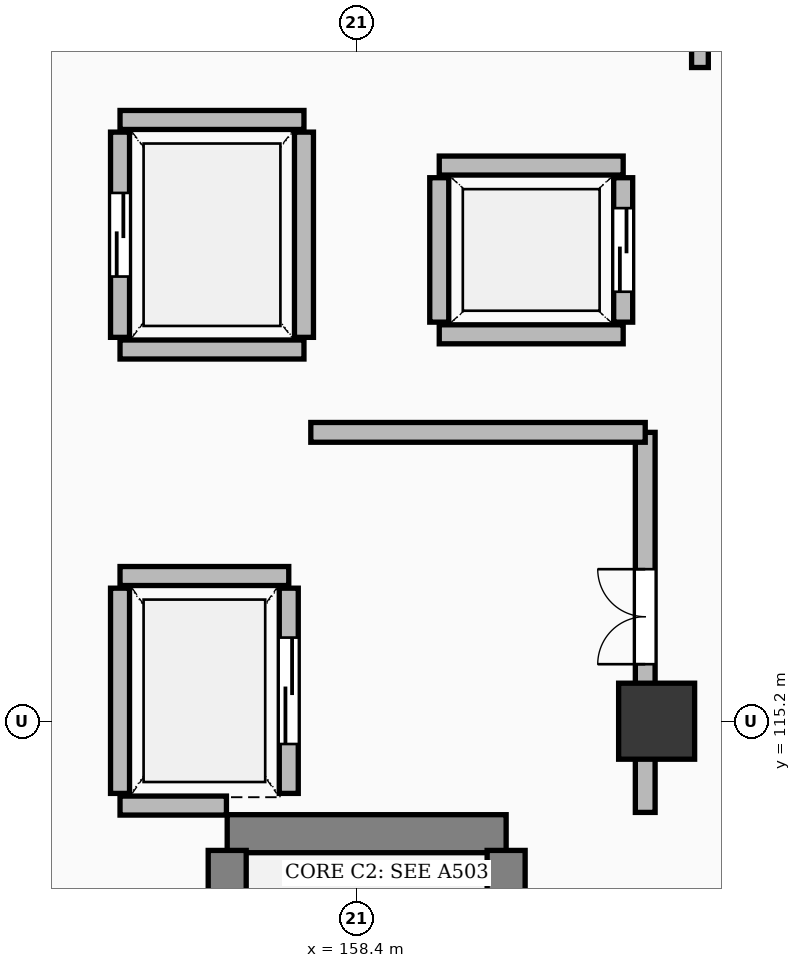
"""IFC4 building model, lengths in metres.
Left out: names, types, materials, properties, quantities, classifications, styles, units other than length and angle.
Written with IfcOpenShell. Run it as: python <this file> out.ifc"""

import sys

from ifc_helpers import new_model, si_unit, direction, frame, frame_2d, origin, origin_2d, place, context, subcontext, project, spatial, rectangle, extrude, element, fill, save


model = new_model("IFC4")
c1 = context("Model", 3, precision=1e-05, world=origin(), true_north=direction((0.0, 1.0)))
c2 = subcontext(c1, "Body", "Model", "MODEL_VIEW")
j1 = project(units=[si_unit("LENGTHUNIT", "METRE"), si_unit("PLANEANGLEUNIT", "RADIAN")], contexts=[c1])
p1 = place(None, origin())
s1 = spatial("IfcSite", under=j1, at=p1, CompositionType="ELEMENT")
p2 = place(p1, origin())
s2 = spatial("IfcBuilding", under=s1, at=p2, CompositionType="ELEMENT")
p3 = place(p2, frame((0.0, 0.0, 6.0)))
s3 = spatial("IfcBuildingStorey", under=s2, at=p3, CompositionType="ELEMENT", Elevation=6.0)
p4 = place(p3, frame((162.35, 115.2, 0.0), z_axis=(0.0, 0.0, 1.0), x_axis=(1.0, 0.0, 0.0)))
e1 = element("IfcColumn", 1, at=p4, inside=s3, PredefinedType="COLUMN", context=c2, shape_type="SweptSolid", body=[
    extrude(rectangle(XDim=1.0, YDim=1.0, at=origin_2d()), origin(), (0.0, 0.0, 1.0), 5.4),
])
p5 = place(p3, frame((156.7, 113.72, 0.0), z_axis=(0.0, 0.0, 1.0), x_axis=(1.0, 0.0, 0.0)))
e2 = element("IfcWall", 2, at=p5, inside=s3, PredefinedType="SHEAR", context=c2, shape_type="SweptSolid", body=[
    extrude(rectangle(XDim=3.67, YDim=0.5, at=frame_2d((1.835, 0.0))), origin(), (0.0, 0.0, 1.0), 5.1),
])
p6 = place(p3, frame((156.7, 103.0, 0.0), z_axis=(0.0, 0.0, 1.0), x_axis=(0.0, 1.0, 0.0)))
e3 = element("IfcWall", 3, at=p6, inside=s3, PredefinedType="SHEAR", context=c2, shape_type="SweptSolid", body=[
    extrude(rectangle(XDim=10.5, YDim=0.5, at=frame_2d((5.25, 0.0))), origin(), (0.0, 0.0, 1.0), 5.1),
])
p7 = place(p3, frame((160.37, 103.0, 0.0), z_axis=(0.0, 0.0, 1.0), x_axis=(0.0, 1.0, 0.0)))
e4 = element("IfcWall", 4, at=p7, inside=s3, PredefinedType="SHEAR", context=c2, shape_type="SweptSolid", body=[
    extrude(rectangle(XDim=10.5, YDim=0.5, at=frame_2d((5.25, 0.0))), origin(), (0.0, 0.0, 1.0), 5.1),
])
p8 = place(p7, frame((0.45, 0.0, 0.0)))
e5 = element("IfcOpeningElement", 5, at=p8, cuts=e4, PredefinedType="OPENING", context=c2, shape_type="SweptSolid", body=[
    extrude(rectangle(XDim=1.3, YDim=2.15, at=frame_2d((0.65, 1.075))), frame((0.0, 0.262, 0.0), z_axis=(0.0, -1.0, 0.0), x_axis=(1.0, 0.0, 0.0)), (0.0, 0.0, 1.0), 0.524),
])
p9 = place(p3, frame((155.29, 114.09, 0.0), z_axis=(0.0, 0.0, 1.0), x_axis=(1.0, 0.0, 0.0)))
e6 = element("IfcWall", 6, at=p9, inside=s3, PredefinedType="SOLIDWALL", context=c2, shape_type="SweptSolid", body=[
    extrude(rectangle(XDim=1.4, YDim=0.25, at=frame_2d((0.7, 0.0))), origin(), (0.0, 0.0, 1.0), 5.1),
])
p10 = place(p3, frame((155.29, 117.11, 0.0), z_axis=(0.0, 0.0, 1.0), x_axis=(1.0, 0.0, 0.0)))
e7 = element("IfcWall", 7, at=p10, inside=s3, PredefinedType="SOLIDWALL", context=c2, shape_type="SweptSolid", body=[
    extrude(rectangle(XDim=2.22, YDim=0.25, at=frame_2d((1.11, 0.0))), origin(), (0.0, 0.0, 1.0), 5.1),
])
p11 = place(p3, frame((155.29, 114.25, 0.0), z_axis=(0.0, 0.0, 1.0), x_axis=(0.0, 1.0, 0.0)))
e8 = element("IfcWall", 8, at=p11, inside=s3, PredefinedType="SOLIDWALL", context=c2, shape_type="SweptSolid", body=[
    extrude(rectangle(XDim=2.7, YDim=0.25, at=frame_2d((1.35, 0.0))), origin(), (0.0, 0.0, 1.0), 4.312),
])
p12 = place(p3, frame((157.51, 114.25, 0.0), z_axis=(0.0, 0.0, 1.0), x_axis=(0.0, 1.0, 0.0)))
e9 = element("IfcWall", 9, at=p12, inside=s3, PredefinedType="SOLIDWALL", context=c2, shape_type="SweptSolid", body=[
    extrude(rectangle(XDim=2.7, YDim=0.25, at=frame_2d((1.35, 0.0))), origin(), (0.0, 0.0, 1.0), 4.312),
])
p13 = place(p12, frame((0.65, 0.0, 0.0)))
e10 = element("IfcOpeningElement", 10, at=p13, cuts=e9, PredefinedType="OPENING", context=c2, shape_type="SweptSolid", body=[
    extrude(rectangle(XDim=1.4, YDim=2.3, at=frame_2d((0.7, 1.15))), frame((0.0, 0.137, 0.0), z_axis=(0.0, -1.0, 0.0), x_axis=(1.0, 0.0, 0.0)), (0.0, 0.0, 1.0), 0.274),
])
for number, where, z_axis, x_axis in (
    (11, (159.49, 120.29, 0.0), (0.0, 0.0, 1.0), (1.0, 0.0, 0.0)),
    (12, (159.49, 122.51, 0.0), (0.0, 0.0, 1.0), (1.0, 0.0, 0.0)),
):
    element("IfcWall", number, at=place(p3, frame(where, z_axis=z_axis, x_axis=x_axis)), inside=s3, PredefinedType="SOLIDWALL", context=c2, shape_type="SweptSolid", body=[
        extrude(rectangle(XDim=2.42, YDim=0.25, at=frame_2d((1.21, 0.0))), origin(), (0.0, 0.0, 1.0), 5.1),
    ])
p14 = place(p3, frame((159.49, 120.45, 0.0), z_axis=(0.0, 0.0, 1.0), x_axis=(0.0, 1.0, 0.0)))
e13 = element("IfcWall", 13, at=p14, inside=s3, PredefinedType="SOLIDWALL", context=c2, shape_type="SweptSolid", body=[
    extrude(rectangle(XDim=1.9, YDim=0.25, at=frame_2d((0.95, 0.0))), origin(), (0.0, 0.0, 1.0), 5.1),
])
p15 = place(p3, frame((161.91, 120.45, 0.0), z_axis=(0.0, 0.0, 1.0), x_axis=(0.0, 1.0, 0.0)))
e14 = element("IfcWall", 14, at=p15, inside=s3, PredefinedType="SOLIDWALL", context=c2, shape_type="SweptSolid", body=[
    extrude(rectangle(XDim=1.9, YDim=0.25, at=frame_2d((0.95, 0.0))), origin(), (0.0, 0.0, 1.0), 5.1),
])
p16 = place(p15, frame((0.4, 0.0, 0.0)))
e15 = element("IfcOpeningElement", 15, at=p16, cuts=e14, PredefinedType="OPENING", context=c2, shape_type="SweptSolid", body=[
    extrude(rectangle(XDim=1.1, YDim=2.2, at=frame_2d((0.55, 1.1))), frame((0.0, 0.137, 0.0), z_axis=(0.0, -1.0, 0.0), x_axis=(1.0, 0.0, 0.0)), (0.0, 0.0, 1.0), 0.274),
])
for number, where, z_axis, x_axis in (
    (16, (155.29, 120.09, 0.0), (0.0, 0.0, 1.0), (1.0, 0.0, 0.0)),
    (17, (155.29, 123.11, 0.0), (0.0, 0.0, 1.0), (1.0, 0.0, 0.0)),
):
    element("IfcWall", number, at=place(p3, frame(where, z_axis=z_axis, x_axis=x_axis)), inside=s3, PredefinedType="SOLIDWALL", context=c2, shape_type="SweptSolid", body=[
        extrude(rectangle(XDim=2.42, YDim=0.25, at=frame_2d((1.21, 0.0))), origin(), (0.0, 0.0, 1.0), 5.1),
    ])
p17 = place(p3, frame((155.29, 120.25, 0.0), z_axis=(0.0, 0.0, 1.0), x_axis=(0.0, 1.0, 0.0)))
e18 = element("IfcWall", 18, at=p17, inside=s3, PredefinedType="SOLIDWALL", context=c2, shape_type="SweptSolid", body=[
    extrude(rectangle(XDim=2.7, YDim=0.25, at=frame_2d((1.35, 0.0))), origin(), (0.0, 0.0, 1.0), 5.1),
])
p18 = place(p17, frame((0.8, 0.0, 0.0)))
e19 = element("IfcOpeningElement", 19, at=p18, cuts=e18, PredefinedType="OPENING", context=c2, shape_type="SweptSolid", body=[
    extrude(rectangle(XDim=1.1, YDim=2.2, at=frame_2d((0.55, 1.1))), frame((0.0, 0.137, 0.0), z_axis=(0.0, -1.0, 0.0), x_axis=(1.0, 0.0, 0.0)), (0.0, 0.0, 1.0), 0.274),
])
p19 = place(p3, frame((157.71, 120.25, 0.0), z_axis=(0.0, 0.0, 1.0), x_axis=(0.0, 1.0, 0.0)))
e20 = element("IfcWall", 20, at=p19, inside=s3, PredefinedType="SOLIDWALL", context=c2, shape_type="SweptSolid", body=[
    extrude(rectangle(XDim=2.7, YDim=0.25, at=frame_2d((1.35, 0.0))), origin(), (0.0, 0.0, 1.0), 5.1),
])
p20 = place(p3, frame((162.2, 114.0, 0.0), z_axis=(0.0, 0.0, 1.0), x_axis=(0.0, 1.0, 0.0)))
e21 = element("IfcWall", 21, at=p20, inside=s3, PredefinedType="SOLIDWALL", context=c2, shape_type="SweptSolid", body=[
    extrude(rectangle(XDim=5.0, YDim=0.26, at=frame_2d((2.5, 0.0))), origin(), (0.0, 0.0, 1.0), 4.312),
])
p21 = place(p20, frame((1.95, 0.0, 0.0)))
e22 = element("IfcOpeningElement", 22, at=p21, cuts=e21, PredefinedType="OPENING", context=c2, shape_type="SweptSolid", body=[
    extrude(rectangle(XDim=1.25, YDim=2.15, at=frame_2d((0.625, 1.075))), frame((0.0, 0.142, 0.0), z_axis=(0.0, -1.0, 0.0), x_axis=(1.0, 0.0, 0.0)), (0.0, 0.0, 1.0), 0.284),
])
p22 = place(p3, frame((157.8, 119.0, 0.0), z_axis=(0.0, 0.0, 1.0), x_axis=(1.0, 0.0, 0.0)))
e23 = element("IfcWall", 23, at=p22, inside=s3, PredefinedType="SOLIDWALL", context=c2, shape_type="SweptSolid", body=[
    extrude(rectangle(XDim=4.4, YDim=0.26, at=frame_2d((2.2, 0.0))), origin(), (0.0, 0.0, 1.0), 4.312),
])
p23 = place(p3, frame((162.92, 123.8, 0.0), z_axis=(0.0, 0.0, 1.0), x_axis=(0.0, 1.0, 0.0)))
e24 = element("IfcWall", 24, at=p23, inside=s3, PredefinedType="PARTITIONING", context=c2, shape_type="SweptSolid", body=[
    extrude(rectangle(XDim=1.85, YDim=0.22, at=frame_2d((0.925, 0.0))), origin(), (0.0, 0.0, 1.0), 4.342),
])
p24 = place(p13, origin())
e25 = element("IfcDoor", 25, at=p24, inside=s3, OperationType="SLIDING_TO_LEFT", PredefinedType="DOOR", context=c2, shape_type="SweptSolid", body=[
    extrude(rectangle(XDim=1.4, YDim=2.3, at=frame_2d((0.7, 1.15))), frame((0.0, 0.025, 0.0), z_axis=(0.0, -1.0, 0.0), x_axis=(1.0, 0.0, 0.0)), (0.0, 0.0, 1.0), 0.05),
])
fill(e10, e25)
p25 = place(p16, origin())
e26 = element("IfcDoor", 26, at=p25, inside=s3, OperationType="SLIDING_TO_LEFT", PredefinedType="DOOR", context=c2, shape_type="SweptSolid", body=[
    extrude(rectangle(XDim=1.1, YDim=2.2, at=frame_2d((0.55, 1.1))), frame((0.0, 0.025, 0.0), z_axis=(0.0, -1.0, 0.0), x_axis=(1.0, 0.0, 0.0)), (0.0, 0.0, 1.0), 0.05),
])
fill(e15, e26)
p26 = place(p18, origin())
e27 = element("IfcDoor", 27, at=p26, inside=s3, OperationType="SLIDING_TO_LEFT", PredefinedType="DOOR", context=c2, shape_type="SweptSolid", body=[
    extrude(rectangle(XDim=1.1, YDim=2.2, at=frame_2d((0.55, 1.1))), frame((0.0, 0.025, 0.0), z_axis=(0.0, -1.0, 0.0), x_axis=(1.0, 0.0, 0.0)), (0.0, 0.0, 1.0), 0.05),
])
fill(e19, e27)
p27 = place(p21, origin())
e28 = element("IfcDoor", 28, at=p27, inside=s3, OperationType="DOUBLE_DOOR_SINGLE_SWING", PredefinedType="DOOR", context=c2, shape_type="SweptSolid", body=[
    extrude(rectangle(XDim=1.25, YDim=2.15, at=frame_2d((0.625, 1.075))), frame((0.0, 0.025, 0.0), z_axis=(0.0, -1.0, 0.0), x_axis=(1.0, 0.0, 0.0)), (0.0, 0.0, 1.0), 0.05),
])
fill(e22, e28)
save(model, sys.argv[1])
